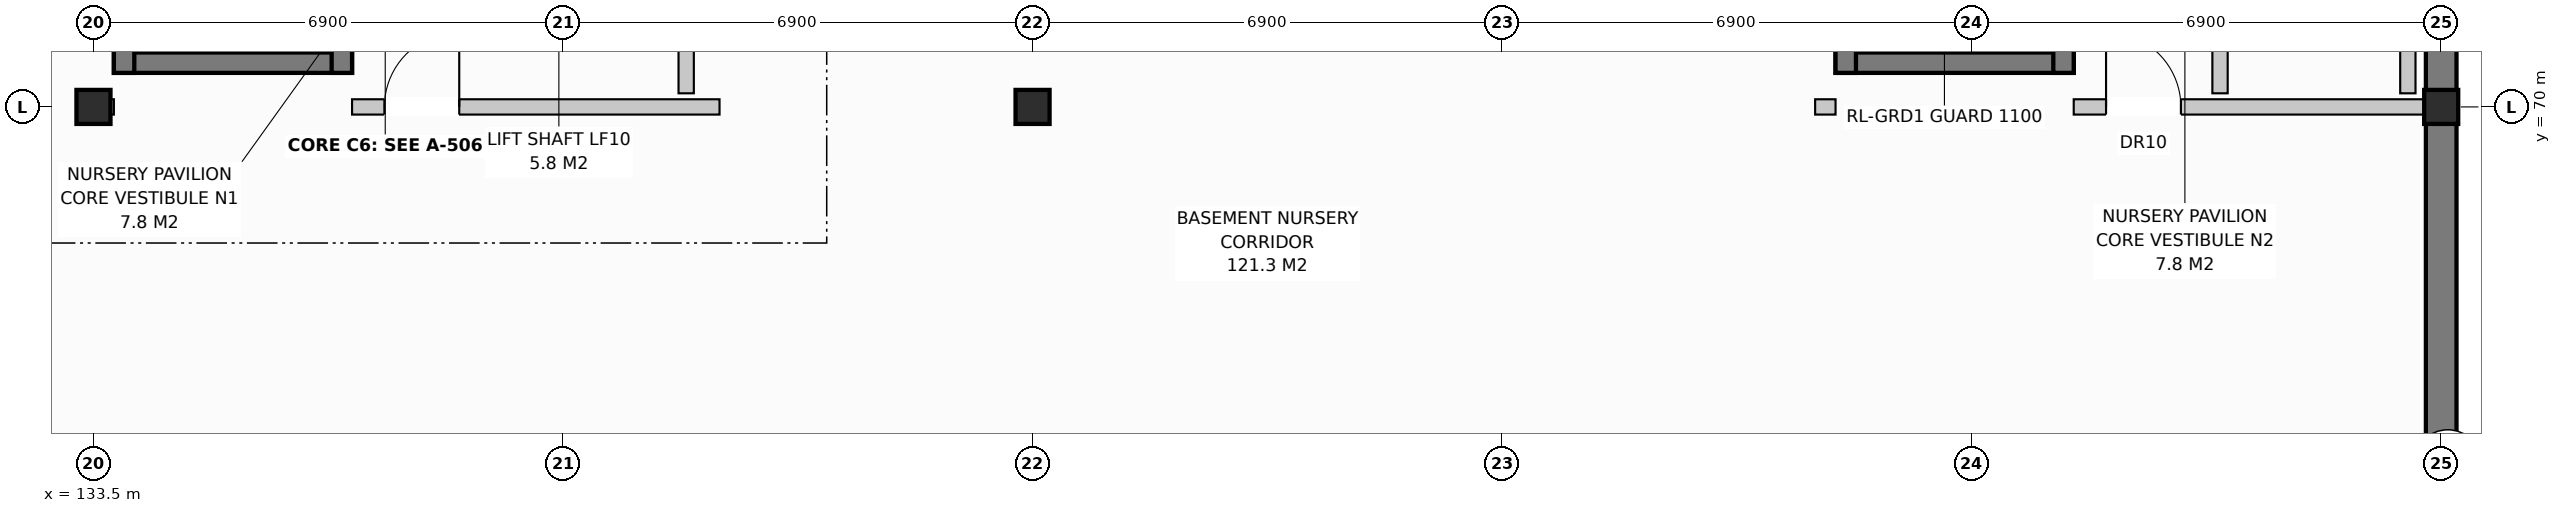
"""IFC4 building model, lengths in metres.
Left out: names, types, materials, properties, quantities, classifications, styles, units other than length and angle.
Written with IfcOpenShell. Run it as: python <this file> out.ifc"""

import sys

from ifc_helpers import new_model, si_unit, direction, frame, frame_2d, origin, origin_with_axes, origin_2d, place, context, subcontext, project, spatial, rectangle, extrude, element, fill, save


model = new_model("IFC4")
c1 = context("Model", 3, precision=1e-05, world=origin(), true_north=direction((0.0, 1.0)))
c2 = subcontext(c1, "Body", "Model", "MODEL_VIEW")
j1 = project(units=[si_unit("LENGTHUNIT", "METRE"), si_unit("PLANEANGLEUNIT", "RADIAN")], contexts=[c1])
p1 = place(None, origin())
s1 = spatial("IfcSite", under=j1, at=p1, CompositionType="ELEMENT")
p2 = place(p1, origin())
s2 = spatial("IfcBuilding", under=s1, at=p2, CompositionType="ELEMENT")
p3 = place(p2, frame((0.0, 0.0, -3.8)))
s3 = spatial("IfcBuildingStorey", under=s2, at=p3, CompositionType="ELEMENT", Elevation=-3.8)
for number, where, z_axis, x_axis in (
    (1, (133.5, 70.0, 0.0), (0.0, 0.0, 1.0), (1.0, 0.0, 0.0)),
    (2, (147.3, 70.0, 0.0), (0.0, 0.0, 1.0), (1.0, 0.0, 0.0)),
    (3, (168.0, 70.0, 0.0), (0.0, 0.0, 1.0), (1.0, 0.0, 0.0)),
):
    element("IfcColumn", number, at=place(p3, frame(where, z_axis=z_axis, x_axis=x_axis)), inside=s3, PredefinedType="COLUMN", context=c2, shape_type="SweptSolid", body=[
        extrude(rectangle(XDim=0.5, YDim=0.5, at=origin_2d()), origin(), (0.0, 0.0, 1.0), 3.8),
    ])
p4 = place(p3, frame((168.0, 0.0, 0.0), z_axis=(0.0, 0.0, 1.0), x_axis=(0.0, 1.0, 0.0)))
e4 = element("IfcWall", 4, at=p4, inside=s3, PredefinedType="STANDARD", context=c2, shape_type="SweptSolid", body=[
    extrude(rectangle(XDim=116.0, YDim=0.45, at=frame_2d((58.0, 0.0))), origin(), (0.0, 0.0, 1.0), 3.48),
])
p5 = place(p3, frame((133.8, 70.65, 0.0), z_axis=(0.0, 0.0, 1.0), x_axis=(1.0, 0.0, 0.0)))
e5 = element("IfcWall", 5, at=p5, inside=s3, PredefinedType="SHEAR", context=c2, shape_type="SweptSolid", body=[
    extrude(rectangle(XDim=3.5, YDim=0.3, at=frame_2d((1.75, 0.0))), origin(), (0.0, 0.0, 1.0), 3.48),
])
p6 = place(p3, frame((133.95, 70.5, 0.0), z_axis=(0.0, 0.0, 1.0), x_axis=(0.0, 1.0, 0.0)))
e6 = element("IfcWall", 6, at=p6, inside=s3, PredefinedType="SHEAR", context=c2, shape_type="SweptSolid", body=[
    extrude(rectangle(XDim=7.5, YDim=0.3, at=frame_2d((3.75, 0.0))), origin(), (0.0, 0.0, 1.0), 3.48),
])
p7 = place(p3, frame((137.15, 70.5, 0.0), z_axis=(0.0, 0.0, 1.0), x_axis=(0.0, 1.0, 0.0)))
e7 = element("IfcWall", 7, at=p7, inside=s3, PredefinedType="SHEAR", context=c2, shape_type="SweptSolid", body=[
    extrude(rectangle(XDim=7.5, YDim=0.3, at=frame_2d((3.75, 0.0))), origin(), (0.0, 0.0, 1.0), 3.48),
])
p8 = place(p7, frame((5.7, 0.0, 0.0)))
e8 = element("IfcOpeningElement", 8, at=p8, cuts=e7, PredefinedType="OPENING", context=c2, shape_type="SweptSolid", body=[
    extrude(rectangle(XDim=1.15, YDim=2.15, at=frame_2d((0.575, 1.075))), frame((0.0, 0.162, 0.0), z_axis=(0.0, -1.0, 0.0), x_axis=(1.0, 0.0, 0.0)), (0.0, 0.0, 1.0), 0.324),
])
p9 = place(p3, frame((142.21, 70.2, 0.0), z_axis=(0.0, 0.0, 1.0), x_axis=(0.0, 1.0, 0.0)))
e9 = element("IfcWall", 9, at=p9, inside=s3, PredefinedType="PARTITIONING", context=c2, shape_type="SweptSolid", body=[
    extrude(rectangle(XDim=7.6, YDim=0.225, at=frame_2d((3.8, 0.0))), origin(), (0.0, 0.0, 1.0), 3.48),
])
p10 = place(p3, frame((133.5, 70.0, 0.0), z_axis=(0.0, 0.0, 1.0), x_axis=(1.0, 0.0, 0.0)))
e10 = element("IfcWall", 10, at=p10, inside=s3, PredefinedType="PARTITIONING", context=c2, shape_type="SweptSolid", body=[
    extrude(rectangle(XDim=0.3, YDim=0.225, at=frame_2d((0.15, 0.0))), origin(), (0.0, 0.0, 1.0), 3.48),
])
p11 = place(p3, frame((137.3, 70.0, 0.0), z_axis=(0.0, 0.0, 1.0), x_axis=(1.0, 0.0, 0.0)))
e11 = element("IfcWall", 11, at=p11, inside=s3, PredefinedType="PARTITIONING", context=c2, shape_type="SweptSolid", body=[
    extrude(rectangle(XDim=5.4, YDim=0.225, at=frame_2d((2.7, 0.0))), origin(), (0.0, 0.0, 1.0), 3.03),
])
p12 = place(p11, frame((0.475, 0.0, 0.0)))
e12 = element("IfcOpeningElement", 12, at=p12, cuts=e11, PredefinedType="OPENING", context=c2, shape_type="SweptSolid", body=[
    extrude(rectangle(XDim=1.1, YDim=2.15, at=frame_2d((0.55, 1.075))), frame((0.0, 0.125, 0.0), z_axis=(0.0, -1.0, 0.0), x_axis=(1.0, 0.0, 0.0)), (0.0, 0.0, 1.0), 0.249),
])
p13 = place(p3, frame((159.1, 70.65, 0.0), z_axis=(0.0, 0.0, 1.0), x_axis=(1.0, 0.0, 0.0)))
e13 = element("IfcWall", 13, at=p13, inside=s3, PredefinedType="SHEAR", context=c2, shape_type="SweptSolid", body=[
    extrude(rectangle(XDim=3.5, YDim=0.3, at=frame_2d((1.75, 0.0))), origin(), (0.0, 0.0, 1.0), 3.48),
])
p14 = place(p3, frame((159.25, 70.5, 0.0), z_axis=(0.0, 0.0, 1.0), x_axis=(0.0, 1.0, 0.0)))
e14 = element("IfcWall", 14, at=p14, inside=s3, PredefinedType="SHEAR", context=c2, shape_type="SweptSolid", body=[
    extrude(rectangle(XDim=7.5, YDim=0.3, at=frame_2d((3.75, 0.0))), origin(), (0.0, 0.0, 1.0), 3.48),
])
p15 = place(p3, frame((162.45, 70.5, 0.0), z_axis=(0.0, 0.0, 1.0), x_axis=(0.0, 1.0, 0.0)))
e15 = element("IfcWall", 15, at=p15, inside=s3, PredefinedType="SHEAR", context=c2, shape_type="SweptSolid", body=[
    extrude(rectangle(XDim=7.5, YDim=0.3, at=frame_2d((3.75, 0.0))), origin(), (0.0, 0.0, 1.0), 3.48),
])
p16 = place(p15, frame((5.7, 0.0, 0.0)))
e16 = element("IfcOpeningElement", 16, at=p16, cuts=e15, PredefinedType="OPENING", context=c2, shape_type="SweptSolid", body=[
    extrude(rectangle(XDim=1.15, YDim=2.15, at=frame_2d((0.575, 1.075))), frame((0.0, 0.162, 0.0), z_axis=(0.0, -1.0, 0.0), x_axis=(1.0, 0.0, 0.0)), (0.0, 0.0, 1.0), 0.324),
])
p17 = place(p3, frame((167.51, 70.2, 0.0), z_axis=(0.0, 0.0, 1.0), x_axis=(0.0, 1.0, 0.0)))
e17 = element("IfcWall", 17, at=p17, inside=s3, PredefinedType="PARTITIONING", context=c2, shape_type="SweptSolid", body=[
    extrude(rectangle(XDim=7.6, YDim=0.225, at=frame_2d((3.8, 0.0))), origin(), (0.0, 0.0, 1.0), 3.48),
])
p18 = place(p3, frame((164.75, 70.2, 0.0), z_axis=(0.0, 0.0, 1.0), x_axis=(0.0, 1.0, 0.0)))
e18 = element("IfcWall", 18, at=p18, inside=s3, PredefinedType="PARTITIONING", context=c2, shape_type="SweptSolid", body=[
    extrude(rectangle(XDim=3.8, YDim=0.225, at=frame_2d((1.9, 0.0))), origin(), (0.0, 0.0, 1.0), 3.48),
])
p19 = place(p3, frame((158.8, 70.0, 0.0), z_axis=(0.0, 0.0, 1.0), x_axis=(1.0, 0.0, 0.0)))
e19 = element("IfcWall", 19, at=p19, inside=s3, PredefinedType="PARTITIONING", context=c2, shape_type="SweptSolid", body=[
    extrude(rectangle(XDim=0.3, YDim=0.225, at=frame_2d((0.15, 0.0))), origin(), (0.0, 0.0, 1.0), 3.48),
])
p20 = place(p3, frame((162.6, 70.0, 0.0), z_axis=(0.0, 0.0, 1.0), x_axis=(1.0, 0.0, 0.0)))
e20 = element("IfcWall", 20, at=p20, inside=s3, PredefinedType="PARTITIONING", context=c2, shape_type="SweptSolid", body=[
    extrude(rectangle(XDim=5.4, YDim=0.225, at=frame_2d((2.7, 0.0))), origin(), (0.0, 0.0, 1.0), 2.93),
])
p21 = place(p20, frame((0.475, 0.0, 0.0)))
e21 = element("IfcOpeningElement", 21, at=p21, cuts=e20, PredefinedType="OPENING", context=c2, shape_type="SweptSolid", body=[
    extrude(rectangle(XDim=1.1, YDim=2.15, at=frame_2d((0.55, 1.075))), frame((0.0, 0.125, 0.0), z_axis=(0.0, -1.0, 0.0), x_axis=(1.0, 0.0, 0.0)), (0.0, 0.0, 1.0), 0.249),
])
p22 = place(p12, origin_with_axes())
e22 = element("IfcDoor", 22, at=p22, inside=s3, OperationType="SINGLE_SWING_RIGHT", PredefinedType="DOOR", context=c2, shape_type="SweptSolid", body=[
    extrude(rectangle(XDim=1.1, YDim=2.15, at=frame_2d((0.55, 1.075))), frame((0.0, 0.025, 0.0), z_axis=(0.0, -1.0, 0.0), x_axis=(1.0, 0.0, 0.0)), (0.0, 0.0, 1.0), 0.05),
])
fill(e12, e22)
p23 = place(p21, origin_with_axes())
e23 = element("IfcDoor", 23, at=p23, inside=s3, OperationType="SINGLE_SWING_LEFT", PredefinedType="DOOR", context=c2, shape_type="SweptSolid", body=[
    extrude(rectangle(XDim=1.1, YDim=2.15, at=frame_2d((0.55, 1.075))), frame((0.0, 0.025, 0.0), z_axis=(0.0, -1.0, 0.0), x_axis=(1.0, 0.0, 0.0)), (0.0, 0.0, 1.0), 0.05),
])
fill(e21, e23)
save(model, sys.argv[1])
